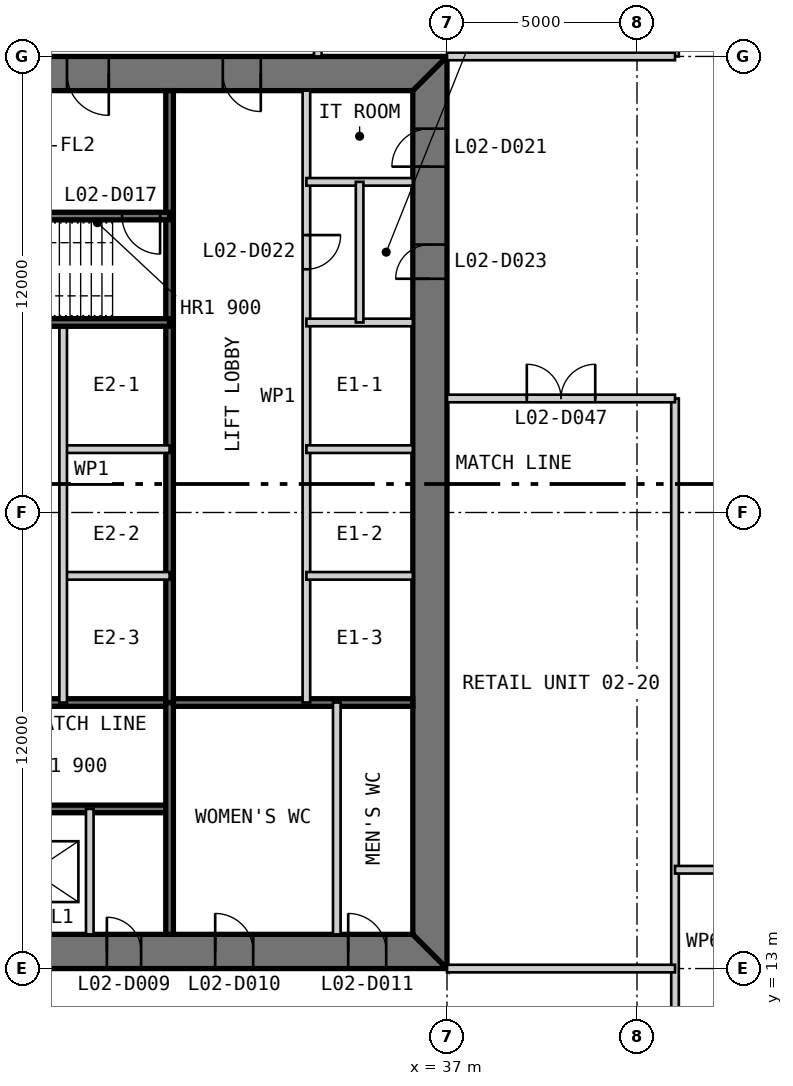
"""IFC4 building model, lengths in metres.
Left out: names, types, materials, properties, quantities, classifications, styles, units other than length and angle.
Written with IfcOpenShell. Run it as: python <this file> out.ifc"""

import sys

from ifc_helpers import new_model, si_unit, direction, frame, frame_2d, origin, place, context, subcontext, project, spatial, polyline, rectangle, outline, extrude, element, fill, save


model = new_model("IFC4")
c1 = context("Model", 3, precision=1e-05, world=origin(), true_north=direction((0.0, 1.0)))
c2 = subcontext(c1, "Body", "Model", "MODEL_VIEW")
j1 = project(units=[si_unit("LENGTHUNIT", "METRE"), si_unit("PLANEANGLEUNIT", "RADIAN")], contexts=[c1])
p1 = place(None, origin())
s1 = spatial("IfcSite", under=j1, at=p1, CompositionType="ELEMENT")
p2 = place(p1, origin())
s2 = spatial("IfcBuilding", under=s1, at=p2, CompositionType="ELEMENT")
p3 = place(p2, frame((0.0, 0.0, 11.8)))
s3 = spatial("IfcBuildingStorey", under=s2, at=p3, CompositionType="ELEMENT", Elevation=11.8)
p4 = place(p3, frame((13.0, 13.45, 0.0), z_axis=(0.0, 0.0, 1.0), x_axis=(1.0, 0.0, 0.0)))
e1 = element("IfcWall", 1, at=p4, inside=s3, PredefinedType="SHEAR", context=c2, shape_type="SweptSolid", body=[
    extrude(outline(polyline([(0.0, -0.45), (24.0, -0.45), (23.1, 0.45), (0.9, 0.45), (0.0, -0.45)])), origin(), (0.0, 0.0, 1.0), 4.8),
])
p5 = place(p4, frame((4.9, 0.0, 0.0)))
e2 = element("IfcOpeningElement", 2, at=p5, cuts=e1, PredefinedType="OPENING", context=c2, shape_type="SweptSolid", body=[
    extrude(rectangle(XDim=1.0, YDim=2.2, at=frame_2d((0.5, 1.1))), frame((0.0, 0.46, 0.0), z_axis=(0.0, -1.0, 0.0), x_axis=(1.0, 0.0, 0.0)), (0.0, 0.0, 1.0), 0.92),
])
p6 = place(p4, frame((8.9, 0.0, 0.0)))
e3 = element("IfcOpeningElement", 3, at=p6, cuts=e1, PredefinedType="OPENING", context=c2, shape_type="SweptSolid", body=[
    extrude(rectangle(XDim=1.1, YDim=2.2, at=frame_2d((0.55, 1.1))), frame((0.0, 0.46, 0.0), z_axis=(0.0, -1.0, 0.0), x_axis=(1.0, 0.0, 0.0)), (0.0, 0.0, 1.0), 0.92),
])
p7 = place(p4, frame((15.05, 0.0, 0.0)))
e4 = element("IfcOpeningElement", 4, at=p7, cuts=e1, PredefinedType="OPENING", context=c2, shape_type="SweptSolid", body=[
    extrude(rectangle(XDim=0.9, YDim=2.2, at=frame_2d((0.45, 1.1))), frame((0.0, 0.46, 0.0), z_axis=(0.0, -1.0, 0.0), x_axis=(1.0, 0.0, 0.0)), (0.0, 0.0, 1.0), 0.92),
])
p8 = place(p4, frame((17.9, 0.0, 0.0)))
e5 = element("IfcOpeningElement", 5, at=p8, cuts=e1, PredefinedType="OPENING", context=c2, shape_type="SweptSolid", body=[
    extrude(rectangle(XDim=1.0, YDim=2.2, at=frame_2d((0.5, 1.1))), frame((0.0, 0.46, 0.0), z_axis=(0.0, -1.0, 0.0), x_axis=(1.0, 0.0, 0.0)), (0.0, 0.0, 1.0), 0.92),
])
p9 = place(p4, frame((21.4, 0.0, 0.0)))
e6 = element("IfcOpeningElement", 6, at=p9, cuts=e1, PredefinedType="OPENING", context=c2, shape_type="SweptSolid", body=[
    extrude(rectangle(XDim=1.0, YDim=2.2, at=frame_2d((0.5, 1.1))), frame((0.0, 0.46, 0.0), z_axis=(0.0, -1.0, 0.0), x_axis=(1.0, 0.0, 0.0)), (0.0, 0.0, 1.0), 0.92),
])
p10 = place(p3, frame((36.55, 13.9, 0.0), z_axis=(0.0, 0.0, 1.0), x_axis=(0.0, 1.0, 0.0)))
e7 = element("IfcWall", 7, at=p10, inside=s3, PredefinedType="SHEAR", context=c2, shape_type="SweptSolid", body=[
    extrude(outline(polyline([(-0.9, -0.45), (23.1, -0.45), (22.2, 0.45), (0.0, 0.45), (-0.9, -0.45)])), origin(), (0.0, 0.0, 1.0), 4.8),
])
p11 = place(p10, frame((20.2, 0.0, 0.0)))
e8 = element("IfcOpeningElement", 8, at=p11, cuts=e7, PredefinedType="OPENING", context=c2, shape_type="SweptSolid", body=[
    extrude(rectangle(XDim=1.0, YDim=2.2, at=frame_2d((0.5, 1.1))), frame((0.0, 0.46, 0.0), z_axis=(0.0, -1.0, 0.0), x_axis=(1.0, 0.0, 0.0)), (0.0, 0.0, 1.0), 0.92),
])
p12 = place(p10, frame((17.25, 0.0, 0.0)))
e9 = element("IfcOpeningElement", 9, at=p12, cuts=e7, PredefinedType="OPENING", context=c2, shape_type="SweptSolid", body=[
    extrude(rectangle(XDim=0.9, YDim=2.2, at=frame_2d((0.45, 1.1))), frame((0.0, 0.46, 0.0), z_axis=(0.0, -1.0, 0.0), x_axis=(1.0, 0.0, 0.0)), (0.0, 0.0, 1.0), 0.92),
])
p13 = place(p3, frame((37.0, 36.55, 0.0), z_axis=(0.0, 0.0, 1.0), x_axis=(-1.0, 0.0, 0.0)))
e10 = element("IfcWall", 10, at=p13, inside=s3, PredefinedType="SHEAR", context=c2, shape_type="SweptSolid", body=[
    extrude(outline(polyline([(0.0, -0.45), (24.0, -0.45), (23.1, 0.45), (0.9, 0.45), (0.0, -0.45)])), origin(), (0.0, 0.0, 1.0), 4.8),
])
p14 = place(p13, frame((4.9, 0.0, 0.0)))
e11 = element("IfcOpeningElement", 11, at=p14, cuts=e10, PredefinedType="OPENING", context=c2, shape_type="SweptSolid", body=[
    extrude(rectangle(XDim=1.0, YDim=2.2, at=frame_2d((0.5, 1.1))), frame((0.0, 0.46, 0.0), z_axis=(0.0, -1.0, 0.0), x_axis=(1.0, 0.0, 0.0)), (0.0, 0.0, 1.0), 0.92),
])
p15 = place(p13, frame((8.9, 0.0, 0.0)))
e12 = element("IfcOpeningElement", 12, at=p15, cuts=e10, PredefinedType="OPENING", context=c2, shape_type="SweptSolid", body=[
    extrude(rectangle(XDim=1.1, YDim=2.2, at=frame_2d((0.55, 1.1))), frame((0.0, 0.46, 0.0), z_axis=(0.0, -1.0, 0.0), x_axis=(1.0, 0.0, 0.0)), (0.0, 0.0, 1.0), 0.92),
])
p16 = place(p13, frame((15.05, 0.0, 0.0)))
e13 = element("IfcOpeningElement", 13, at=p16, cuts=e10, PredefinedType="OPENING", context=c2, shape_type="SweptSolid", body=[
    extrude(rectangle(XDim=0.9, YDim=2.2, at=frame_2d((0.45, 1.1))), frame((0.0, 0.46, 0.0), z_axis=(0.0, -1.0, 0.0), x_axis=(1.0, 0.0, 0.0)), (0.0, 0.0, 1.0), 0.92),
])
p17 = place(p13, frame((17.9, 0.0, 0.0)))
e14 = element("IfcOpeningElement", 14, at=p17, cuts=e10, PredefinedType="OPENING", context=c2, shape_type="SweptSolid", body=[
    extrude(rectangle(XDim=1.0, YDim=2.2, at=frame_2d((0.5, 1.1))), frame((0.0, 0.46, 0.0), z_axis=(0.0, -1.0, 0.0), x_axis=(1.0, 0.0, 0.0)), (0.0, 0.0, 1.0), 0.92),
])
p18 = place(p13, frame((21.4, 0.0, 0.0)))
e15 = element("IfcOpeningElement", 15, at=p18, cuts=e10, PredefinedType="OPENING", context=c2, shape_type="SweptSolid", body=[
    extrude(rectangle(XDim=1.0, YDim=2.2, at=frame_2d((0.5, 1.1))), frame((0.0, 0.46, 0.0), z_axis=(0.0, -1.0, 0.0), x_axis=(1.0, 0.0, 0.0)), (0.0, 0.0, 1.0), 0.92),
])
p19 = place(p3, frame((20.3, 17.2, 0.0), z_axis=(0.0, 0.0, 1.0), x_axis=(1.0, 0.0, 0.0)))
e16 = element("IfcWall", 16, at=p19, inside=s3, PredefinedType="SOLIDWALL", context=c2, shape_type="SweptSolid", body=[
    extrude(rectangle(XDim=9.4, YDim=0.2, at=frame_2d((4.7, 0.0))), origin(), (0.0, 0.0, 1.0), 4.6),
])
p20 = place(p19, frame((0.25, 0.0, 0.0)))
e17 = element("IfcOpeningElement", 17, at=p20, cuts=e16, PredefinedType="OPENING", context=c2, shape_type="SweptSolid", body=[
    extrude(rectangle(XDim=1.0, YDim=2.2, at=frame_2d((0.5, 1.1))), frame((0.0, 0.11, 0.0), z_axis=(0.0, -1.0, 0.0), x_axis=(1.0, 0.0, 0.0)), (0.0, 0.0, 1.0), 0.22),
])
p21 = place(p3, frame((20.3, 20.0, 0.0), z_axis=(0.0, 0.0, 1.0), x_axis=(1.0, 0.0, 0.0)))
e18 = element("IfcWall", 18, at=p21, inside=s3, PredefinedType="SOLIDWALL", context=c2, shape_type="SweptSolid", body=[
    extrude(rectangle(XDim=15.8, YDim=0.2, at=frame_2d((7.9, 0.0))), origin(), (0.0, 0.0, 1.0), 4.6),
])
p22 = place(p3, frame((27.6, 13.9, 0.0), z_axis=(0.0, 0.0, 1.0), x_axis=(0.0, 1.0, 0.0)))
e19 = element("IfcWall", 19, at=p22, inside=s3, PredefinedType="PARTITIONING", context=c2, shape_type="SweptSolid", body=[
    extrude(rectangle(XDim=3.3, YDim=0.2, at=frame_2d((1.65, 0.0))), origin(), (0.0, 0.0, 1.0), 4.6),
])
p23 = place(p3, frame((29.7, 13.9, 0.0), z_axis=(0.0, 0.0, 1.0), x_axis=(0.0, 1.0, 0.0)))
e20 = element("IfcWall", 20, at=p23, inside=s3, PredefinedType="SOLIDWALL", context=c2, shape_type="SweptSolid", body=[
    extrude(rectangle(XDim=6.1, YDim=0.2, at=frame_2d((3.05, 0.0))), origin(), (0.0, 0.0, 1.0), 4.6),
])
p24 = place(p3, frame((34.1, 13.9, 0.0), z_axis=(0.0, 0.0, 1.0), x_axis=(0.0, 1.0, 0.0)))
e21 = element("IfcWall", 21, at=p24, inside=s3, PredefinedType="PARTITIONING", context=c2, shape_type="SweptSolid", body=[
    extrude(rectangle(XDim=6.1, YDim=0.2, at=frame_2d((3.05, 0.0))), origin(), (0.0, 0.0, 1.0), 4.6),
])
p25 = place(p3, frame((33.3, 36.1, 0.0), z_axis=(0.0, 0.0, 1.0), x_axis=(0.0, -1.0, 0.0)))
e22 = element("IfcWall", 22, at=p25, inside=s3, PredefinedType="PARTITIONING", context=c2, shape_type="SweptSolid", body=[
    extrude(rectangle(XDim=16.1, YDim=0.2, at=frame_2d((8.05, 0.0))), origin(), (0.0, 0.0, 1.0), 4.6),
])
p26 = place(p25, frame((3.8, 0.0, 0.0)))
e23 = element("IfcOpeningElement", 23, at=p26, cuts=e22, PredefinedType="OPENING", context=c2, shape_type="SweptSolid", body=[
    extrude(rectangle(XDim=0.9, YDim=2.2, at=frame_2d((0.45, 1.1))), frame((0.0, 0.11, 0.0), z_axis=(0.0, -1.0, 0.0), x_axis=(1.0, 0.0, 0.0)), (0.0, 0.0, 1.0), 0.22),
])
p27 = place(p3, frame((29.7, 36.1, 0.0), z_axis=(0.0, 0.0, 1.0), x_axis=(0.0, -1.0, 0.0)))
e24 = element("IfcWall", 24, at=p27, inside=s3, PredefinedType="SOLIDWALL", context=c2, shape_type="SweptSolid", body=[
    extrude(rectangle(XDim=16.1, YDim=0.2, at=frame_2d((8.05, 0.0))), origin(), (0.0, 0.0, 1.0), 4.6),
])
for number, where, z_axis, x_axis in (
    (25, (36.1, 30.0, 0.0), (0.0, 0.0, 1.0), (-1.0, 0.0, 0.0)),
    (26, (36.1, 26.667, 0.0), (0.0, 0.0, 1.0), (-1.0, 0.0, 0.0)),
    (27, (36.1, 23.333, 0.0), (0.0, 0.0, 1.0), (-1.0, 0.0, 0.0)),
    (28, (29.7, 26.667, 0.0), (0.0, 0.0, 1.0), (-1.0, 0.0, 0.0)),
    (29, (29.7, 23.333, 0.0), (0.0, 0.0, 1.0), (-1.0, 0.0, 0.0)),
):
    element("IfcWall", number, at=place(p3, frame(where, z_axis=z_axis, x_axis=x_axis)), inside=s3, PredefinedType="PARTITIONING", context=c2, shape_type="SweptSolid", body=[
        extrude(rectangle(XDim=2.8, YDim=0.2, at=frame_2d((1.4, 0.0))), origin(), (0.0, 0.0, 1.0), 4.6),
    ])
p28 = place(p3, frame((26.9, 30.0, 0.0), z_axis=(0.0, 0.0, 1.0), x_axis=(0.0, -1.0, 0.0)))
e30 = element("IfcWall", 30, at=p28, inside=s3, PredefinedType="PARTITIONING", context=c2, shape_type="SweptSolid", body=[
    extrude(rectangle(XDim=10.0, YDim=0.2, at=frame_2d((5.0, 0.0))), origin(), (0.0, 0.0, 1.0), 4.6),
])
p29 = place(p3, frame((29.7, 32.8, 0.0), z_axis=(0.0, 0.0, 1.0), x_axis=(-1.0, 0.0, 0.0)))
e31 = element("IfcWall", 31, at=p29, inside=s3, PredefinedType="SOLIDWALL", context=c2, shape_type="SweptSolid", body=[
    extrude(rectangle(XDim=9.4, YDim=0.2, at=frame_2d((4.7, 0.0))), origin(), (0.0, 0.0, 1.0), 4.6),
])
p30 = place(p29, frame((0.25, 0.0, 0.0)))
e32 = element("IfcOpeningElement", 32, at=p30, cuts=e31, PredefinedType="OPENING", context=c2, shape_type="SweptSolid", body=[
    extrude(rectangle(XDim=1.0, YDim=2.2, at=frame_2d((0.5, 1.1))), frame((0.0, 0.11, 0.0), z_axis=(0.0, -1.0, 0.0), x_axis=(1.0, 0.0, 0.0)), (0.0, 0.0, 1.0), 0.22),
])
p31 = place(p3, frame((29.7, 30.0, 0.0), z_axis=(0.0, 0.0, 1.0), x_axis=(-1.0, 0.0, 0.0)))
e33 = element("IfcWall", 33, at=p31, inside=s3, PredefinedType="SOLIDWALL", context=c2, shape_type="SweptSolid", body=[
    extrude(rectangle(XDim=15.8, YDim=0.2, at=frame_2d((7.9, 0.0))), origin(), (0.0, 0.0, 1.0), 4.6),
])
p32 = place(p3, frame((36.1, 33.7, 0.0), z_axis=(0.0, 0.0, 1.0), x_axis=(-1.0, 0.0, 0.0)))
e34 = element("IfcWall", 34, at=p32, inside=s3, PredefinedType="PARTITIONING", context=c2, shape_type="SweptSolid", body=[
    extrude(rectangle(XDim=2.8, YDim=0.2, at=frame_2d((1.4, 0.0))), origin(), (0.0, 0.0, 1.0), 4.6),
])
p33 = place(p3, frame((34.7, 33.7, 0.0), z_axis=(0.0, 0.0, 1.0), x_axis=(0.0, -1.0, 0.0)))
e35 = element("IfcWall", 35, at=p33, inside=s3, PredefinedType="PARTITIONING", context=c2, shape_type="SweptSolid", body=[
    extrude(rectangle(XDim=3.7, YDim=0.2, at=frame_2d((1.85, 0.0))), origin(), (0.0, 0.0, 1.0), 4.6),
])
p34 = place(p3, frame((33.6, 37.0, 0.0), z_axis=(0.0, 0.0, 1.0), x_axis=(0.0, 1.0, 0.0)))
e36 = element("IfcWall", 36, at=p34, inside=s3, PredefinedType="PARTITIONING", context=c2, shape_type="SweptSolid", body=[
    extrude(rectangle(XDim=6.0, YDim=0.2, at=frame_2d((3.0, 0.0))), origin(), (0.0, 0.0, 1.0), 4.5),
])
p35 = place(p34, frame((2.55, 0.0, 0.0)))
e37 = element("IfcOpeningElement", 37, at=p35, cuts=e36, PredefinedType="OPENING", context=c2, shape_type="SweptSolid", body=[
    extrude(rectangle(XDim=0.9, YDim=2.2, at=frame_2d((0.45, 1.1))), frame((0.0, 0.11, 0.0), z_axis=(0.0, -1.0, 0.0), x_axis=(1.0, 0.0, 0.0)), (0.0, 0.0, 1.0), 0.22),
])
p36 = place(p3, frame((43.0, -0.6, 0.0), z_axis=(0.0, 0.0, 1.0), x_axis=(0.0, 1.0, 0.0)))
e38 = element("IfcWall", 38, at=p36, inside=s3, PredefinedType="PARTITIONING", context=c2, shape_type="SweptSolid", body=[
    extrude(rectangle(XDim=28.6, YDim=0.2, at=frame_2d((14.3, 0.0))), origin(), (0.0, 0.0, 1.0), 3.843),
])
p37 = place(p3, frame((43.0, 37.0, 0.0), z_axis=(0.0, 0.0, 1.0), x_axis=(0.0, 1.0, 0.0)))
e39 = element("IfcWall", 39, at=p37, inside=s3, PredefinedType="PARTITIONING", context=c2, shape_type="SweptSolid", body=[
    extrude(rectangle(XDim=20.6, YDim=0.2, at=frame_2d((10.3, 0.0))), origin(), (0.0, 0.0, 1.0), 4.5),
])
p38 = place(p3, frame((37.0, 13.0, 0.0), z_axis=(0.0, 0.0, 1.0), x_axis=(1.0, 0.0, 0.0)))
e40 = element("IfcWall", 40, at=p38, inside=s3, PredefinedType="PARTITIONING", context=c2, shape_type="SweptSolid", body=[
    extrude(rectangle(XDim=6.0, YDim=0.2, at=frame_2d((3.0, 0.0))), origin(), (0.0, 0.0, 1.0), 3.653),
])
p39 = place(p3, frame((43.0, 15.6, 0.0), z_axis=(0.0, 0.0, 1.0), x_axis=(1.0, 0.0, 0.0)))
e41 = element("IfcWall", 41, at=p39, inside=s3, PredefinedType="PARTITIONING", context=c2, shape_type="SweptSolid", body=[
    extrude(rectangle(XDim=14.25, YDim=0.2, at=frame_2d((7.125, 0.0))), origin(), (0.0, 0.0, 1.0), 4.5),
])
p40 = place(p39, frame((10.0, 0.0, 0.0)))
e42 = element("IfcOpeningElement", 42, at=p40, cuts=e41, PredefinedType="OPENING", context=c2, shape_type="SweptSolid", body=[
    extrude(rectangle(XDim=1.8, YDim=2.4, at=frame_2d((0.9, 1.2))), frame((0.0, 0.11, 0.0), z_axis=(0.0, -1.0, 0.0), x_axis=(1.0, 0.0, 0.0)), (0.0, 0.0, 1.0), 0.22),
])
p41 = place(p39, frame((2.925, 0.0, 0.0)))
e43 = element("IfcOpeningElement", 43, at=p41, cuts=e41, PredefinedType="OPENING", context=c2, shape_type="SweptSolid", body=[
    extrude(rectangle(XDim=1.8, YDim=2.4, at=frame_2d((0.9, 1.2))), frame((0.0, 0.11, 0.0), z_axis=(0.0, -1.0, 0.0), x_axis=(1.0, 0.0, 0.0)), (0.0, 0.0, 1.0), 0.22),
])
p42 = place(p3, frame((37.0, 28.0, 0.0), z_axis=(0.0, 0.0, 1.0), x_axis=(1.0, 0.0, 0.0)))
e44 = element("IfcWall", 44, at=p42, inside=s3, PredefinedType="PARTITIONING", context=c2, shape_type="SweptSolid", body=[
    extrude(rectangle(XDim=6.0, YDim=0.2, at=frame_2d((3.0, 0.0))), origin(), (0.0, 0.0, 1.0), 4.5),
])
p43 = place(p42, frame((2.1, 0.0, 0.0)))
e45 = element("IfcOpeningElement", 45, at=p43, cuts=e44, PredefinedType="OPENING", context=c2, shape_type="SweptSolid", body=[
    extrude(rectangle(XDim=1.8, YDim=2.4, at=frame_2d((0.9, 1.2))), frame((0.0, 0.11, 0.0), z_axis=(0.0, -1.0, 0.0), x_axis=(1.0, 0.0, 0.0)), (0.0, 0.0, 1.0), 0.22),
])
p44 = place(p3, frame((37.0, 37.0, 0.0), z_axis=(0.0, 0.0, 1.0), x_axis=(1.0, 0.0, 0.0)))
e46 = element("IfcWall", 46, at=p44, inside=s3, PredefinedType="PARTITIONING", context=c2, shape_type="SweptSolid", body=[
    extrude(rectangle(XDim=6.0, YDim=0.2, at=frame_2d((3.0, 0.0))), origin(), (0.0, 0.0, 1.0), 3.653),
])
p45 = place(p7, origin())
e47 = element("IfcDoor", 47, at=p45, inside=s3, OperationType="SINGLE_SWING_LEFT", PredefinedType="DOOR", context=c2, shape_type="SweptSolid", body=[
    extrude(rectangle(XDim=0.9, YDim=2.2, at=frame_2d((0.45, 1.1))), frame((0.0, 0.025, 0.0), z_axis=(0.0, -1.0, 0.0), x_axis=(1.0, 0.0, 0.0)), (0.0, 0.0, 1.0), 0.05),
    extrude(outline(polyline([(0.0, 0.0), (0.04, 0.0), (0.04, 2.16), (0.86, 2.16), (0.86, 0.0), (0.9, 0.0), (0.9, 2.2), (0.0, 2.2), (0.0, 0.0)])), frame((0.0, 0.3, 0.0), z_axis=(0.0, -1.0, 0.0), x_axis=(1.0, 0.0, 0.0)), (0.0, 0.0, 1.0), 0.6),
])
fill(e4, e47)
p46 = place(p8, origin())
e48 = element("IfcDoor", 48, at=p46, inside=s3, OperationType="SINGLE_SWING_LEFT", PredefinedType="DOOR", context=c2, shape_type="SweptSolid", body=[
    extrude(rectangle(XDim=1.0, YDim=2.2, at=frame_2d((0.5, 1.1))), frame((0.0, 0.025, 0.0), z_axis=(0.0, -1.0, 0.0), x_axis=(1.0, 0.0, 0.0)), (0.0, 0.0, 1.0), 0.05),
    extrude(outline(polyline([(0.0, 0.0), (0.04, 0.0), (0.04, 2.16), (0.96, 2.16), (0.96, 0.0), (1.0, 0.0), (1.0, 2.2), (0.0, 2.2), (0.0, 0.0)])), frame((0.0, 0.3, 0.0), z_axis=(0.0, -1.0, 0.0), x_axis=(1.0, 0.0, 0.0)), (0.0, 0.0, 1.0), 0.6),
])
fill(e5, e48)
p47 = place(p9, origin())
e49 = element("IfcDoor", 49, at=p47, inside=s3, OperationType="SINGLE_SWING_LEFT", PredefinedType="DOOR", context=c2, shape_type="SweptSolid", body=[
    extrude(rectangle(XDim=1.0, YDim=2.2, at=frame_2d((0.5, 1.1))), frame((0.0, 0.025, 0.0), z_axis=(0.0, -1.0, 0.0), x_axis=(1.0, 0.0, 0.0)), (0.0, 0.0, 1.0), 0.05),
    extrude(outline(polyline([(0.0, 0.0), (0.04, 0.0), (0.04, 2.16), (0.96, 2.16), (0.96, 0.0), (1.0, 0.0), (1.0, 2.2), (0.0, 2.2), (0.0, 0.0)])), frame((0.0, 0.3, 0.0), z_axis=(0.0, -1.0, 0.0), x_axis=(1.0, 0.0, 0.0)), (0.0, 0.0, 1.0), 0.6),
])
fill(e6, e49)
p48 = place(p14, origin())
e50 = element("IfcDoor", 50, at=p48, inside=s3, OperationType="SINGLE_SWING_LEFT", PredefinedType="DOOR", context=c2, shape_type="SweptSolid", body=[
    extrude(rectangle(XDim=1.0, YDim=2.2, at=frame_2d((0.5, 1.1))), frame((0.0, 0.025, 0.0), z_axis=(0.0, -1.0, 0.0), x_axis=(1.0, 0.0, 0.0)), (0.0, 0.0, 1.0), 0.05),
    extrude(outline(polyline([(0.0, 0.0), (0.04, 0.0), (0.04, 2.16), (0.96, 2.16), (0.96, 0.0), (1.0, 0.0), (1.0, 2.2), (0.0, 2.2), (0.0, 0.0)])), frame((0.0, 0.3, 0.0), z_axis=(0.0, -1.0, 0.0), x_axis=(1.0, 0.0, 0.0)), (0.0, 0.0, 1.0), 0.6),
])
fill(e11, e50)
p49 = place(p15, origin())
e51 = element("IfcDoor", 51, at=p49, inside=s3, OperationType="SINGLE_SWING_LEFT", PredefinedType="DOOR", context=c2, shape_type="SweptSolid", body=[
    extrude(rectangle(XDim=1.1, YDim=2.2, at=frame_2d((0.55, 1.1))), frame((0.0, 0.025, 0.0), z_axis=(0.0, -1.0, 0.0), x_axis=(1.0, 0.0, 0.0)), (0.0, 0.0, 1.0), 0.05),
    extrude(outline(polyline([(0.0, 0.0), (0.04, 0.0), (0.04, 2.16), (1.06, 2.16), (1.06, 0.0), (1.1, 0.0), (1.1, 2.2), (0.0, 2.2), (0.0, 0.0)])), frame((0.0, 0.3, 0.0), z_axis=(0.0, -1.0, 0.0), x_axis=(1.0, 0.0, 0.0)), (0.0, 0.0, 1.0), 0.6),
])
fill(e12, e51)
p50 = place(p30, origin())
e52 = element("IfcDoor", 52, at=p50, inside=s3, OperationType="SINGLE_SWING_LEFT", PredefinedType="DOOR", context=c2, shape_type="SweptSolid", body=[
    extrude(rectangle(XDim=1.0, YDim=2.2, at=frame_2d((0.5, 1.1))), frame((0.0, 0.025, 0.0), z_axis=(0.0, -1.0, 0.0), x_axis=(1.0, 0.0, 0.0)), (0.0, 0.0, 1.0), 0.05),
])
fill(e32, e52)
p51 = place(p11, origin())
e53 = element("IfcDoor", 53, at=p51, inside=s3, OperationType="SINGLE_SWING_LEFT", PredefinedType="DOOR", context=c2, shape_type="SweptSolid", body=[
    extrude(rectangle(XDim=1.0, YDim=2.2, at=frame_2d((0.5, 1.1))), frame((0.0, 0.025, 0.0), z_axis=(0.0, -1.0, 0.0), x_axis=(1.0, 0.0, 0.0)), (0.0, 0.0, 1.0), 0.05),
    extrude(outline(polyline([(0.0, 0.0), (0.04, 0.0), (0.04, 2.16), (0.96, 2.16), (0.96, 0.0), (1.0, 0.0), (1.0, 2.2), (0.0, 2.2), (0.0, 0.0)])), frame((0.0, 0.3, 0.0), z_axis=(0.0, -1.0, 0.0), x_axis=(1.0, 0.0, 0.0)), (0.0, 0.0, 1.0), 0.6),
])
fill(e8, e53)
p52 = place(p26, origin())
e54 = element("IfcDoor", 54, at=p52, inside=s3, OperationType="SINGLE_SWING_LEFT", PredefinedType="DOOR", context=c2, shape_type="SweptSolid", body=[
    extrude(rectangle(XDim=0.9, YDim=2.2, at=frame_2d((0.45, 1.1))), frame((0.0, 0.025, 0.0), z_axis=(0.0, -1.0, 0.0), x_axis=(1.0, 0.0, 0.0)), (0.0, 0.0, 1.0), 0.05),
])
fill(e23, e54)
p53 = place(p12, origin())
e55 = element("IfcDoor", 55, at=p53, inside=s3, OperationType="SINGLE_SWING_LEFT", PredefinedType="DOOR", context=c2, shape_type="SweptSolid", body=[
    extrude(rectangle(XDim=0.9, YDim=2.2, at=frame_2d((0.45, 1.1))), frame((0.0, 0.025, 0.0), z_axis=(0.0, -1.0, 0.0), x_axis=(1.0, 0.0, 0.0)), (0.0, 0.0, 1.0), 0.05),
    extrude(outline(polyline([(0.0, 0.0), (0.04, 0.0), (0.04, 2.16), (0.86, 2.16), (0.86, 0.0), (0.9, 0.0), (0.9, 2.2), (0.0, 2.2), (0.0, 0.0)])), frame((0.0, 0.3, 0.0), z_axis=(0.0, -1.0, 0.0), x_axis=(1.0, 0.0, 0.0)), (0.0, 0.0, 1.0), 0.6),
])
fill(e9, e55)
p54 = place(p43, origin())
e56 = element("IfcDoor", 56, at=p54, inside=s3, OperationType="DOUBLE_DOOR_SINGLE_SWING", PredefinedType="DOOR", context=c2, shape_type="SweptSolid", body=[
    extrude(rectangle(XDim=1.8, YDim=2.4, at=frame_2d((0.9, 1.2))), frame((0.0, 0.025, 0.0), z_axis=(0.0, -1.0, 0.0), x_axis=(1.0, 0.0, 0.0)), (0.0, 0.0, 1.0), 0.05),
])
fill(e45, e56)
save(model, sys.argv[1])
